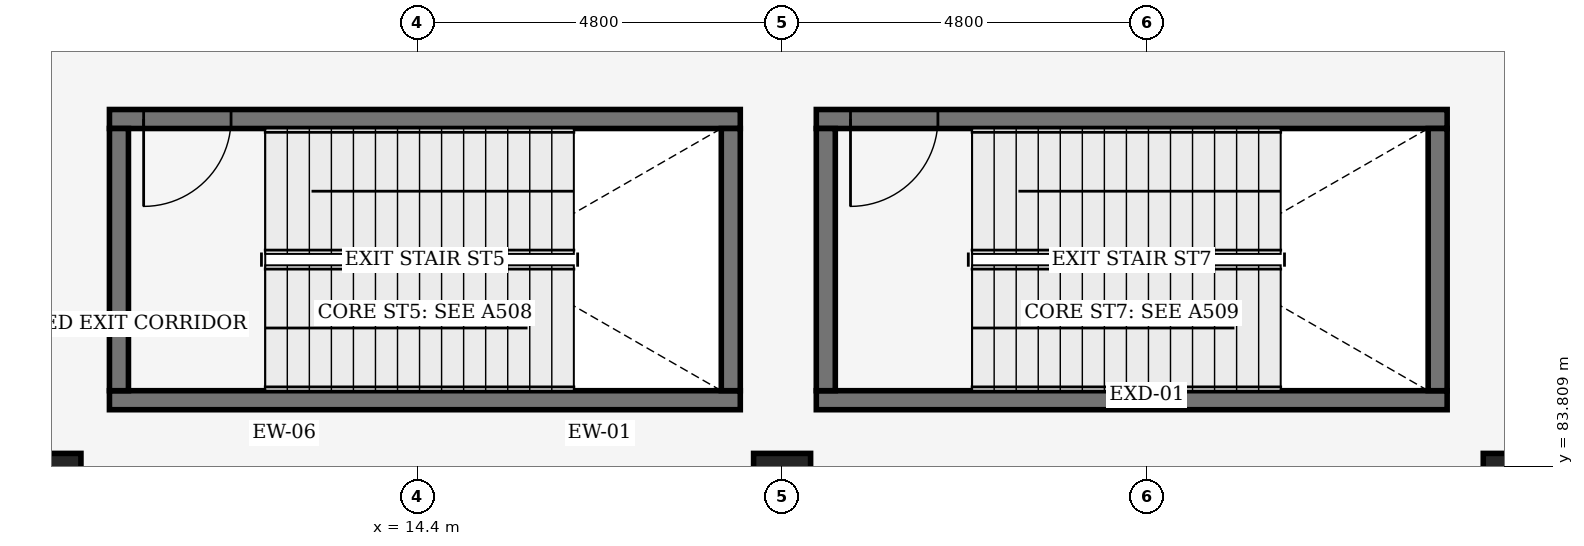
"""IFC4 building model, lengths in metres.
Left out: names, types, materials, properties, quantities, classifications, styles, units other than length and angle.
Written with IfcOpenShell. Run it as: python <this file> out.ifc"""

import sys

from ifc_helpers import new_model, si_unit, direction, frame, frame_2d, origin, origin_2d, place, context, subcontext, project, spatial, rectangle, extrude, element, fill, save


model = new_model("IFC4")
c1 = context("Model", 3, precision=1e-05, world=origin(), true_north=direction((0.0, 1.0)))
c2 = subcontext(c1, "Body", "Model", "MODEL_VIEW")
j1 = project(units=[si_unit("LENGTHUNIT", "METRE"), si_unit("PLANEANGLEUNIT", "RADIAN")], contexts=[c1])
p1 = place(None, origin())
s1 = spatial("IfcSite", under=j1, at=p1, CompositionType="ELEMENT")
p2 = place(p1, origin())
s2 = spatial("IfcBuilding", under=s1, at=p2, CompositionType="ELEMENT")
p3 = place(p2, origin())
s3 = spatial("IfcBuildingStorey", under=s2, at=p3, CompositionType="ELEMENT", Elevation=0.0)
for number, where, z_axis, x_axis in (
    (1, (9.6, 83.6, 0.0), (0.0, 0.0, 1.0), (1.0, 0.0, 0.0)),
    (2, (19.2, 83.6, 0.0), (0.0, 0.0, 1.0), (1.0, 0.0, 0.0)),
    (3, (28.8, 83.6, 0.0), (0.0, 0.0, 1.0), (1.0, 0.0, 0.0)),
):
    element("IfcColumn", number, at=place(p3, frame(where, z_axis=z_axis, x_axis=x_axis)), inside=s3, PredefinedType="COLUMN", context=c2, shape_type="SweptSolid", body=[
        extrude(rectangle(XDim=0.75, YDim=0.75, at=origin_2d()), origin(), (0.0, 0.0, 1.0), 5.4),
    ])
p4 = place(p3, frame((10.35, 84.675, 0.0), z_axis=(0.0, 0.0, 1.0), x_axis=(1.0, 0.0, 0.0)))
e4 = element("IfcWall", 4, at=p4, inside=s3, PredefinedType="SHEAR", context=c2, shape_type="SweptSolid", body=[
    extrude(rectangle(XDim=8.3, YDim=0.25, at=frame_2d((4.15, 0.0))), origin(), (0.0, 0.0, 1.0), 5.1),
])
p5 = place(p3, frame((18.65, 88.375, 0.0), z_axis=(0.0, 0.0, 1.0), x_axis=(-1.0, 0.0, 0.0)))
e5 = element("IfcWall", 5, at=p5, inside=s3, PredefinedType="SHEAR", context=c2, shape_type="SweptSolid", body=[
    extrude(rectangle(XDim=8.3, YDim=0.25, at=frame_2d((4.15, 0.0))), origin(), (0.0, 0.0, 1.0), 5.1),
])
p6 = place(p5, frame((7.85, 0.0, 0.0), z_axis=(0.0, 0.0, 1.0), x_axis=(-1.0, 0.0, 0.0)))
e6 = element("IfcOpeningElement", 6, at=p6, cuts=e5, PredefinedType="OPENING", context=c2, shape_type="SweptSolid", body=[
    extrude(rectangle(XDim=1.15, YDim=2.2, at=frame_2d((0.575, 1.1))), frame((0.0, 0.135, 0.0), z_axis=(0.0, -1.0, 0.0), x_axis=(1.0, 0.0, 0.0)), (0.0, 0.0, 1.0), 0.27),
])
for number, where, z_axis, x_axis in (
    (7, (10.475, 88.25, 0.0), (0.0, 0.0, 1.0), (0.0, -1.0, 0.0)),
    (8, (18.525, 84.8, 0.0), (0.0, 0.0, 1.0), (0.0, 1.0, 0.0)),
):
    element("IfcWall", number, at=place(p3, frame(where, z_axis=z_axis, x_axis=x_axis)), inside=s3, PredefinedType="SHEAR", context=c2, shape_type="SweptSolid", body=[
        extrude(rectangle(XDim=3.45, YDim=0.25, at=frame_2d((1.725, 0.0))), origin(), (0.0, 0.0, 1.0), 5.1),
    ])
p7 = place(p3, frame((19.65, 84.675, 0.0), z_axis=(0.0, 0.0, 1.0), x_axis=(1.0, 0.0, 0.0)))
e9 = element("IfcWall", 9, at=p7, inside=s3, PredefinedType="SHEAR", context=c2, shape_type="SweptSolid", body=[
    extrude(rectangle(XDim=8.3, YDim=0.25, at=frame_2d((4.15, 0.0))), origin(), (0.0, 0.0, 1.0), 5.1),
])
p8 = place(p3, frame((27.95, 88.375, 0.0), z_axis=(0.0, 0.0, 1.0), x_axis=(-1.0, 0.0, 0.0)))
e10 = element("IfcWall", 10, at=p8, inside=s3, PredefinedType="SHEAR", context=c2, shape_type="SweptSolid", body=[
    extrude(rectangle(XDim=8.3, YDim=0.25, at=frame_2d((4.15, 0.0))), origin(), (0.0, 0.0, 1.0), 5.1),
])
p9 = place(p8, frame((7.85, 0.0, 0.0), z_axis=(0.0, 0.0, 1.0), x_axis=(-1.0, 0.0, 0.0)))
e11 = element("IfcOpeningElement", 11, at=p9, cuts=e10, PredefinedType="OPENING", context=c2, shape_type="SweptSolid", body=[
    extrude(rectangle(XDim=1.15, YDim=2.2, at=frame_2d((0.575, 1.1))), frame((0.0, 0.135, 0.0), z_axis=(0.0, -1.0, 0.0), x_axis=(1.0, 0.0, 0.0)), (0.0, 0.0, 1.0), 0.27),
])
for number, where, z_axis, x_axis in (
    (12, (19.775, 88.25, 0.0), (0.0, 0.0, 1.0), (0.0, -1.0, 0.0)),
    (13, (27.825, 84.8, 0.0), (0.0, 0.0, 1.0), (0.0, 1.0, 0.0)),
):
    element("IfcWall", number, at=place(p3, frame(where, z_axis=z_axis, x_axis=x_axis)), inside=s3, PredefinedType="SHEAR", context=c2, shape_type="SweptSolid", body=[
        extrude(rectangle(XDim=3.45, YDim=0.25, at=frame_2d((1.725, 0.0))), origin(), (0.0, 0.0, 1.0), 5.1),
    ])
p10 = place(p6, origin())
e14 = element("IfcDoor", 14, at=p10, inside=s3, OperationType="SINGLE_SWING_LEFT", PredefinedType="DOOR", context=c2, shape_type="SweptSolid", body=[
    extrude(rectangle(XDim=1.15, YDim=2.2, at=frame_2d((0.575, 1.1))), frame((0.0, 0.025, 0.0), z_axis=(0.0, -1.0, 0.0), x_axis=(1.0, 0.0, 0.0)), (0.0, 0.0, 1.0), 0.05),
])
fill(e6, e14)
p11 = place(p9, origin())
e15 = element("IfcDoor", 15, at=p11, inside=s3, OperationType="SINGLE_SWING_LEFT", PredefinedType="DOOR", context=c2, shape_type="SweptSolid", body=[
    extrude(rectangle(XDim=1.15, YDim=2.2, at=frame_2d((0.575, 1.1))), frame((0.0, 0.025, 0.0), z_axis=(0.0, -1.0, 0.0), x_axis=(1.0, 0.0, 0.0)), (0.0, 0.0, 1.0), 0.05),
])
fill(e11, e15)
save(model, sys.argv[1])
